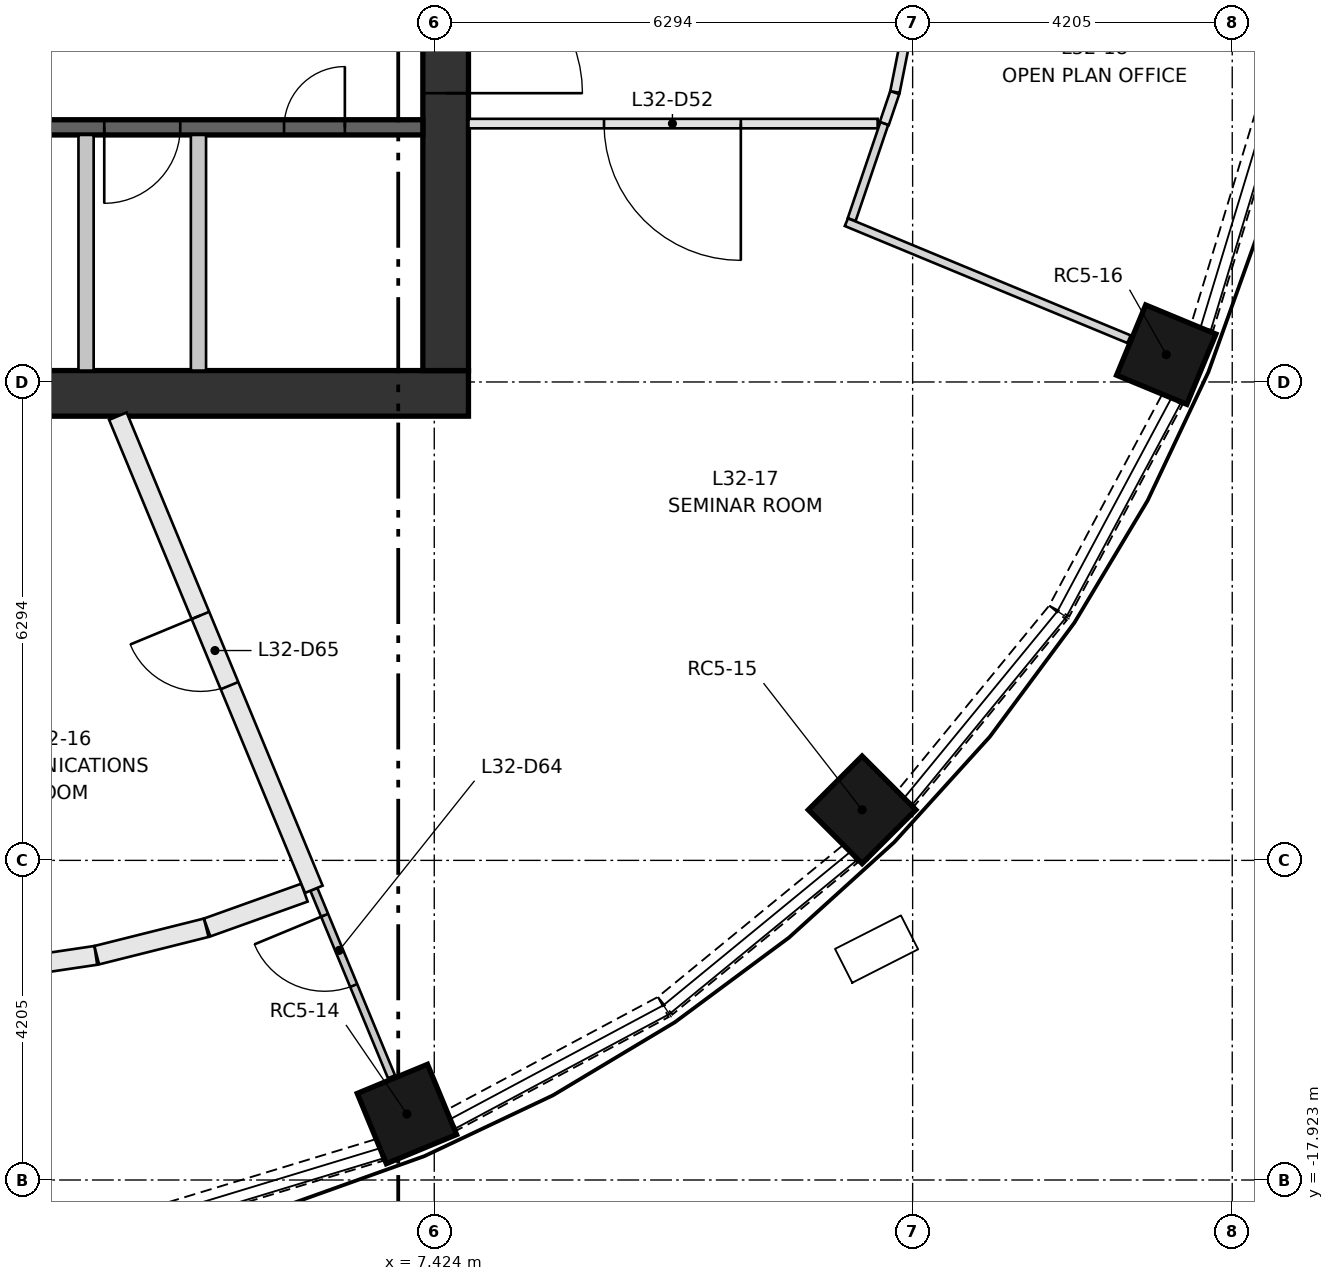
"""IFC4 building model, lengths in metres.
Left out: names, types, materials, properties, quantities, classifications, styles, units other than length and angle.
Written with IfcOpenShell. Run it as: python <this file> out.ifc"""

import sys

from ifc_helpers import new_model, si_unit, direction, frame, frame_2d, origin, origin_2d, place, context, subcontext, project, spatial, rectangle, extrude, element, fill, save


model = new_model("IFC4")
c1 = context("Model", 3, precision=1e-05, world=origin(), true_north=direction((0.0, 1.0)))
c2 = subcontext(c1, "Body", "Model", "MODEL_VIEW")
j1 = project(units=[si_unit("LENGTHUNIT", "METRE"), si_unit("PLANEANGLEUNIT", "RADIAN")], contexts=[c1])
p1 = place(None, origin())
s1 = spatial("IfcSite", under=j1, at=p1, CompositionType="ELEMENT")
p2 = place(p1, origin())
s2 = spatial("IfcBuilding", under=s1, at=p2, CompositionType="ELEMENT")
p3 = place(p2, frame((0.0, 0.0, 124.3)))
s3 = spatial("IfcBuildingStorey", under=s2, at=p3, CompositionType="ELEMENT", Elevation=124.3)
for number, where, z_axis, x_axis in (
    (1, (7.064, -17.055, 0.0), (0.0, 0.0, 1.0), (0.383, -0.924, 0.0)),
    (2, (13.053, -13.053, 0.0), (0.0, 0.0, 1.0), (0.707, -0.707, 0.0)),
    (3, (17.055, -7.064, 0.0), (0.0, 0.0, 1.0), (0.924, -0.383, 0.0)),
):
    element("IfcColumn", number, at=place(p3, frame(where, z_axis=z_axis, x_axis=x_axis)), inside=s3, PredefinedType="COLUMN", context=c2, shape_type="SweptSolid", body=[
        extrude(rectangle(XDim=1.0, YDim=1.0, at=origin_2d()), origin(), (0.0, 0.0, 1.0), 3.35),
    ])
p4 = place(p3, frame((-7.874, -7.574, 0.0), z_axis=(0.0, 0.0, 1.0), x_axis=(1.0, 0.0, 0.0)))
e4 = element("IfcWall", 4, at=p4, inside=s3, PredefinedType="SHEAR", context=c2, shape_type="SweptSolid", body=[
    extrude(rectangle(XDim=15.748, YDim=0.6, at=frame_2d((7.874, 0.0))), origin(), (0.0, 0.0, 1.0), 3.35),
])
p5 = place(p3, frame((7.574, -7.274, 0.0), z_axis=(0.0, 0.0, 1.0), x_axis=(0.0, 1.0, 0.0)))
e5 = element("IfcWall", 5, at=p5, inside=s3, PredefinedType="SHEAR", context=c2, shape_type="SweptSolid", body=[
    extrude(rectangle(XDim=14.548, YDim=0.6, at=frame_2d((7.274, 0.0))), origin(), (0.0, 0.0, 1.0), 3.35),
])
p6 = place(p5, frame((6.774, 0.0, 0.0)))
e6 = element("IfcOpeningElement", 6, at=p6, cuts=e5, PredefinedType="OPENING", context=c2, shape_type="SweptSolid", body=[
    extrude(rectangle(XDim=1.0, YDim=2.1, at=frame_2d((0.5, 1.05))), frame((0.0, 0.31, 0.0), z_axis=(0.0, -1.0, 0.0), x_axis=(1.0, 0.0, 0.0)), (0.0, 0.0, 1.0), 0.62),
])
p7 = place(p5, frame((3.649, 0.0, 0.0)))
e7 = element("IfcOpeningElement", 7, at=p7, cuts=e5, PredefinedType="OPENING", context=c2, shape_type="SweptSolid", body=[
    extrude(rectangle(XDim=1.8, YDim=2.1, at=frame_2d((0.9, 1.05))), frame((0.0, 0.31, 0.0), z_axis=(0.0, -1.0, 0.0), x_axis=(1.0, 0.0, 0.0)), (0.0, 0.0, 1.0), 0.62),
])
p8 = place(p5, frame((9.098, 0.0, 0.0)))
e8 = element("IfcOpeningElement", 8, at=p8, cuts=e5, PredefinedType="OPENING", context=c2, shape_type="SweptSolid", body=[
    extrude(rectangle(XDim=1.8, YDim=2.1, at=frame_2d((0.9, 1.05))), frame((0.0, 0.31, 0.0), z_axis=(0.0, -1.0, 0.0), x_axis=(1.0, 0.0, 0.0)), (0.0, 0.0, 1.0), 0.62),
])
p9 = place(p3, frame((-7.274, -4.074, 0.0), z_axis=(0.0, 0.0, 1.0), x_axis=(1.0, 0.0, 0.0)))
e9 = element("IfcWall", 9, at=p9, inside=s3, PredefinedType="SHEAR", context=c2, shape_type="SweptSolid", body=[
    extrude(rectangle(XDim=14.548, YDim=0.2, at=frame_2d((7.274, 0.0))), origin(), (0.0, 0.0, 1.0), 3.0),
])
p10 = place(p9, frame((1.219, 0.0, 0.0)))
e10 = element("IfcOpeningElement", 10, at=p10, cuts=e9, PredefinedType="OPENING", context=c2, shape_type="SweptSolid", body=[
    extrude(rectangle(XDim=1.1, YDim=2.1, at=frame_2d((0.55, 1.05))), frame((0.0, 0.11, 0.0), z_axis=(0.0, -1.0, 0.0), x_axis=(1.0, 0.0, 0.0)), (0.0, 0.0, 1.0), 0.22),
])
p11 = place(p9, frame((4.355, 0.0, 0.0)))
e11 = element("IfcOpeningElement", 11, at=p11, cuts=e9, PredefinedType="OPENING", context=c2, shape_type="SweptSolid", body=[
    extrude(rectangle(XDim=1.1, YDim=2.1, at=frame_2d((0.55, 1.05))), frame((0.0, 0.11, 0.0), z_axis=(0.0, -1.0, 0.0), x_axis=(1.0, 0.0, 0.0)), (0.0, 0.0, 1.0), 0.22),
])
p12 = place(p9, frame((7.795, 0.0, 0.0)))
e12 = element("IfcOpeningElement", 12, at=p12, cuts=e9, PredefinedType="OPENING", context=c2, shape_type="SweptSolid", body=[
    extrude(rectangle(XDim=1.0, YDim=2.1, at=frame_2d((0.5, 1.05))), frame((0.0, 0.11, 0.0), z_axis=(0.0, -1.0, 0.0), x_axis=(1.0, 0.0, 0.0)), (0.0, 0.0, 1.0), 0.22),
])
p13 = place(p9, frame((10.356, 0.0, 0.0)))
e13 = element("IfcOpeningElement", 13, at=p13, cuts=e9, PredefinedType="OPENING", context=c2, shape_type="SweptSolid", body=[
    extrude(rectangle(XDim=1.0, YDim=2.1, at=frame_2d((0.5, 1.05))), frame((0.0, 0.11, 0.0), z_axis=(0.0, -1.0, 0.0), x_axis=(1.0, 0.0, 0.0)), (0.0, 0.0, 1.0), 0.22),
])
p14 = place(p9, frame((12.722, 0.0, 0.0)))
e14 = element("IfcOpeningElement", 14, at=p14, cuts=e9, PredefinedType="OPENING", context=c2, shape_type="SweptSolid", body=[
    extrude(rectangle(XDim=0.8, YDim=2.1, at=frame_2d((0.4, 1.05))), frame((0.0, 0.11, 0.0), z_axis=(0.0, -1.0, 0.0), x_axis=(1.0, 0.0, 0.0)), (0.0, 0.0, 1.0), 0.22),
])
for number, where, z_axis, x_axis in (
    (15, (2.843, -7.274, 0.0), (0.0, 0.0, 1.0), (0.0, 1.0, 0.0)),
    (16, (4.322, -7.274, 0.0), (0.0, 0.0, 1.0), (0.0, 1.0, 0.0)),
):
    element("IfcWall", number, at=place(p3, frame(where, z_axis=z_axis, x_axis=x_axis)), inside=s3, PredefinedType="PARTITIONING", context=c2, shape_type="SweptSolid", body=[
        extrude(rectangle(XDim=3.1, YDim=0.2, at=frame_2d((1.55, 0.0))), origin(), (0.0, 0.0, 1.0), 3.0),
    ])
p15 = place(p3, frame((3.683, -18.445, 0.0), z_axis=(0.0, 0.0, 1.0), x_axis=(0.956874051907, 0.290503096001, 0.0)))
e17 = element("IfcWall", 17, at=p15, inside=s3, PredefinedType="SOLIDWALL", context=c2, shape_type="SweptSolid", body=[
    extrude(rectangle(XDim=3.157, YDim=0.3, at=frame_2d((1.579, 0.0))), origin(), (0.0, 0.0, 1.0), 0.9),
])
p16 = place(p3, frame((7.654, -17.135, 0.0), z_axis=(0.0, 0.0, 1.0), x_axis=(0.881851238747, 0.471527722113, 0.0)))
e18 = element("IfcWall", 18, at=p16, inside=s3, PredefinedType="SOLIDWALL", context=c2, shape_type="SweptSolid", body=[
    extrude(rectangle(XDim=3.155, YDim=0.3, at=frame_2d((1.578, 0.0))), origin(), (0.0, 0.0, 1.0), 0.9),
])
for number, where, z_axis, x_axis in (
    (19, (10.462, -15.631, 0.0), (0.0, 0.0, 1.0), (0.773, 0.634, 0.0)),
    (20, (13.628, -12.902, 0.0), (0.0, 0.0, 1.0), (0.634, 0.773, 0.0)),
):
    element("IfcWall", number, at=place(p3, frame(where, z_axis=z_axis, x_axis=x_axis)), inside=s3, PredefinedType="SOLIDWALL", context=c2, shape_type="SweptSolid", body=[
        extrude(rectangle(XDim=3.157, YDim=0.3, at=frame_2d((1.578, 0.0))), origin(), (0.0, 0.0, 1.0), 0.9),
    ])
p17 = place(p3, frame((15.647, -10.437, 0.0), z_axis=(0.0, 0.0, 1.0), x_axis=(0.471527722113, 0.881851238747, 0.0)))
e21 = element("IfcWall", 21, at=p17, inside=s3, PredefinedType="SOLIDWALL", context=c2, shape_type="SweptSolid", body=[
    extrude(rectangle(XDim=3.155, YDim=0.3, at=frame_2d((1.578, 0.0))), origin(), (0.0, 0.0, 1.0), 0.9),
])
p18 = place(p3, frame((17.527, -6.705, 0.0), z_axis=(0.0, 0.0, 1.0), x_axis=(0.290503096001, 0.956874051907, 0.0)))
e22 = element("IfcWall", 22, at=p18, inside=s3, PredefinedType="SOLIDWALL", context=c2, shape_type="SweptSolid", body=[
    extrude(rectangle(XDim=3.157, YDim=0.3, at=frame_2d((1.579, 0.0))), origin(), (0.0, 0.0, 1.0), 0.9),
])
p19 = place(p3, frame((13.258, -4.024, 0.0), z_axis=(0.0, 0.0, 1.0), x_axis=(-1.0, 0.0, 0.0)))
e23 = element("IfcWall", 23, at=p19, inside=s3, PredefinedType="PARTITIONING", context=c2, shape_type="SweptSolid", body=[
    extrude(rectangle(XDim=5.384, YDim=0.125, at=frame_2d((2.692, 0.0))), origin(), (0.0, 0.0, 1.0), 3.0),
])
p20 = place(p19, frame((1.8, 0.0, 0.0)))
e24 = element("IfcOpeningElement", 24, at=p20, cuts=e23, PredefinedType="OPENING", context=c2, shape_type="SweptSolid", body=[
    extrude(rectangle(XDim=1.8, YDim=2.1, at=frame_2d((0.9, 1.05))), frame((0.0, 0.073, 0.0), z_axis=(0.0, -1.0, 0.0), x_axis=(1.0, 0.0, 0.0)), (0.0, 0.0, 1.0), 0.145),
])
p21 = place(p3, frame((13.483, -3.617, 0.0), z_axis=(0.0, 0.0, 1.0), x_axis=(-0.321160043658, -0.947024934391, 0.0)))
e25 = element("IfcWall", 25, at=p21, inside=s3, PredefinedType="PARTITIONING", context=c2, shape_type="SweptSolid", body=[
    extrude(rectangle(XDim=0.43, YDim=0.125, at=frame_2d((0.215, 0.0))), origin(), (0.0, 0.0, 1.0), 3.0),
])
p22 = place(p3, frame((13.84, -1.826, 0.0), z_axis=(0.0, 0.0, 1.0), x_axis=(-0.195134630283, -0.980776465901, 0.0)))
e26 = element("IfcWall", 26, at=p22, inside=s3, PredefinedType="PARTITIONING", context=c2, shape_type="SweptSolid", body=[
    extrude(rectangle(XDim=1.818, YDim=0.125, at=frame_2d((0.909, 0.0))), origin(), (0.0, 0.0, 1.0), 3.0),
])
p23 = place(p3, frame((1.502, -15.186, 0.0), z_axis=(0.0, 0.0, 1.0), x_axis=(0.989192869337, 0.146620146136, 0.0)))
e27 = element("IfcWall", 27, at=p23, inside=s3, PredefinedType="PARTITIONING", context=c2, shape_type="SweptSolid", body=[
    extrude(rectangle(XDim=1.485, YDim=0.25, at=frame_2d((0.743, 0.0))), origin(), (0.0, 0.0, 1.0), 3.0),
])
p24 = place(p3, frame((2.983, -14.965, 0.0), z_axis=(0.0, 0.0, 1.0), x_axis=(0.970026334084, 0.24299981725, 0.0)))
e28 = element("IfcWall", 28, at=p24, inside=s3, PredefinedType="PARTITIONING", context=c2, shape_type="SweptSolid", body=[
    extrude(rectangle(XDim=1.485, YDim=0.25, at=frame_2d((0.742, 0.0))), origin(), (0.0, 0.0, 1.0), 3.0),
])
p25 = place(p3, frame((4.436, -14.601, 0.0), z_axis=(0.0, 0.0, 1.0), x_axis=(0.941526469986, 0.336939024626, 0.0)))
e29 = element("IfcWall", 29, at=p25, inside=s3, PredefinedType="PARTITIONING", context=c2, shape_type="SweptSolid", body=[
    extrude(rectangle(XDim=1.36, YDim=0.25, at=frame_2d((0.68, 0.0))), origin(), (0.0, 0.0, 1.0), 3.0),
])
p26 = place(p3, frame((6.862, -16.565, 0.0), z_axis=(0.0, 0.0, 1.0), x_axis=(-0.382744787218, 0.923854116112, 0.0)))
e30 = element("IfcWall", 30, at=p26, inside=s3, PredefinedType="PARTITIONING", context=c2, shape_type="SweptSolid", body=[
    extrude(rectangle(XDim=2.67, YDim=0.1, at=frame_2d((1.335, 0.0))), origin(), (0.0, 0.0, 1.0), 3.0),
])
p27 = place(p26, frame((1.3, 0.0, 0.0)))
e31 = element("IfcOpeningElement", 31, at=p27, cuts=e30, PredefinedType="OPENING", context=c2, shape_type="SweptSolid", body=[
    extrude(rectangle(XDim=1.0, YDim=2.1, at=frame_2d((0.5, 1.05))), frame((0.0, 0.06, 0.0), z_axis=(0.0, -1.0, 0.0), x_axis=(1.0, 0.0, 0.0)), (0.0, 0.0, 1.0), 0.12),
])
p28 = place(p3, frame((5.84, -14.098, 0.0), z_axis=(0.0, 0.0, 1.0), x_axis=(-0.382671840259, 0.923884334034, 0.0)))
e32 = element("IfcWall", 32, at=p28, inside=s3, PredefinedType="PARTITIONING", context=c2, shape_type="SweptSolid", body=[
    extrude(rectangle(XDim=6.737, YDim=0.25, at=frame_2d((3.369, 0.0))), origin(), (0.0, 0.0, 1.0), 3.0),
])
p29 = place(p28, frame((2.9, 0.0, 0.0)))
e33 = element("IfcOpeningElement", 33, at=p29, cuts=e32, PredefinedType="OPENING", context=c2, shape_type="SweptSolid", body=[
    extrude(rectangle(XDim=1.0, YDim=2.1, at=frame_2d((0.5, 1.05))), frame((0.0, 0.135, 0.0), z_axis=(0.0, -1.0, 0.0), x_axis=(1.0, 0.0, 0.0)), (0.0, 0.0, 1.0), 0.27),
])
p30 = place(p3, frame((12.847, -5.321, 0.0), z_axis=(0.0, 0.0, 1.0), x_axis=(0.923877104161, -0.382689294869, 0.0)))
e34 = element("IfcWall", 34, at=p30, inside=s3, PredefinedType="PARTITIONING", context=c2, shape_type="SweptSolid", body=[
    extrude(rectangle(XDim=4.025, YDim=0.11, at=frame_2d((2.012, 0.0))), origin(), (0.0, 0.0, 1.0), 3.0),
])
p31 = place(p3, frame((13.345, -4.024, 0.0), z_axis=(0.0, 0.0, 1.0), x_axis=(-0.32144299332, -0.946928931888, 0.0)))
e35 = element("IfcWall", 35, at=p31, inside=s3, PredefinedType="PARTITIONING", context=c2, shape_type="SweptSolid", body=[
    extrude(rectangle(XDim=1.333, YDim=0.11, at=frame_2d((0.667, 0.0))), origin(), (0.0, 0.0, 1.0), 3.0),
])
p32 = place(p13, frame((1.0, 0.0, 0.0), z_axis=(0.0, 0.0, 1.0), x_axis=(-1.0, 0.0, 0.0)))
e36 = element("IfcDoor", 36, at=p32, inside=s3, OperationType="SINGLE_SWING_LEFT", PredefinedType="DOOR", context=c2, shape_type="SweptSolid", body=[
    extrude(rectangle(XDim=1.0, YDim=2.1, at=frame_2d((0.5, 1.05))), frame((0.0, 0.025, 0.0), z_axis=(0.0, -1.0, 0.0), x_axis=(1.0, 0.0, 0.0)), (0.0, 0.0, 1.0), 0.05),
])
fill(e13, e36)
p33 = place(p14, origin())
e37 = element("IfcDoor", 37, at=p33, inside=s3, OperationType="SINGLE_SWING_RIGHT", PredefinedType="DOOR", context=c2, shape_type="SweptSolid", body=[
    extrude(rectangle(XDim=0.8, YDim=2.1, at=frame_2d((0.4, 1.05))), frame((0.0, 0.025, 0.0), z_axis=(0.0, -1.0, 0.0), x_axis=(1.0, 0.0, 0.0)), (0.0, 0.0, 1.0), 0.05),
])
fill(e14, e37)
p34 = place(p7, frame((1.8, 0.0, 0.0), z_axis=(0.0, 0.0, 1.0), x_axis=(-1.0, 0.0, 0.0)))
e38 = element("IfcDoor", 38, at=p34, inside=s3, OperationType="DOUBLE_DOOR_SINGLE_SWING", PredefinedType="DOOR", context=c2, shape_type="SweptSolid", body=[
    extrude(rectangle(XDim=1.8, YDim=2.1, at=frame_2d((0.9, 1.05))), frame((0.0, 0.025, 0.0), z_axis=(0.0, -1.0, 0.0), x_axis=(1.0, 0.0, 0.0)), (0.0, 0.0, 1.0), 0.05),
])
fill(e7, e38)
p35 = place(p20, origin())
e39 = element("IfcDoor", 39, at=p35, inside=s3, OperationType="DOUBLE_DOOR_SINGLE_SWING", PredefinedType="DOOR", context=c2, shape_type="SweptSolid", body=[
    extrude(rectangle(XDim=1.8, YDim=2.1, at=frame_2d((0.9, 1.05))), frame((0.0, 0.025, 0.0), z_axis=(0.0, -1.0, 0.0), x_axis=(1.0, 0.0, 0.0)), (0.0, 0.0, 1.0), 0.05),
])
fill(e24, e39)
p36 = place(p27, origin())
e40 = element("IfcDoor", 40, at=p36, inside=s3, OperationType="SINGLE_SWING_RIGHT", PredefinedType="DOOR", context=c2, shape_type="SweptSolid", body=[
    extrude(rectangle(XDim=1.0, YDim=2.1, at=frame_2d((0.5, 1.05))), frame((0.0, 0.025, 0.0), z_axis=(0.0, -1.0, 0.0), x_axis=(1.0, 0.0, 0.0)), (0.0, 0.0, 1.0), 0.05),
])
fill(e31, e40)
p37 = place(p29, origin())
e41 = element("IfcDoor", 41, at=p37, inside=s3, OperationType="SINGLE_SWING_RIGHT", PredefinedType="DOOR", context=c2, shape_type="SweptSolid", body=[
    extrude(rectangle(XDim=1.0, YDim=2.1, at=frame_2d((0.5, 1.05))), frame((0.0, 0.025, 0.0), z_axis=(0.0, -1.0, 0.0), x_axis=(1.0, 0.0, 0.0)), (0.0, 0.0, 1.0), 0.05),
])
fill(e33, e41)
save(model, sys.argv[1])
